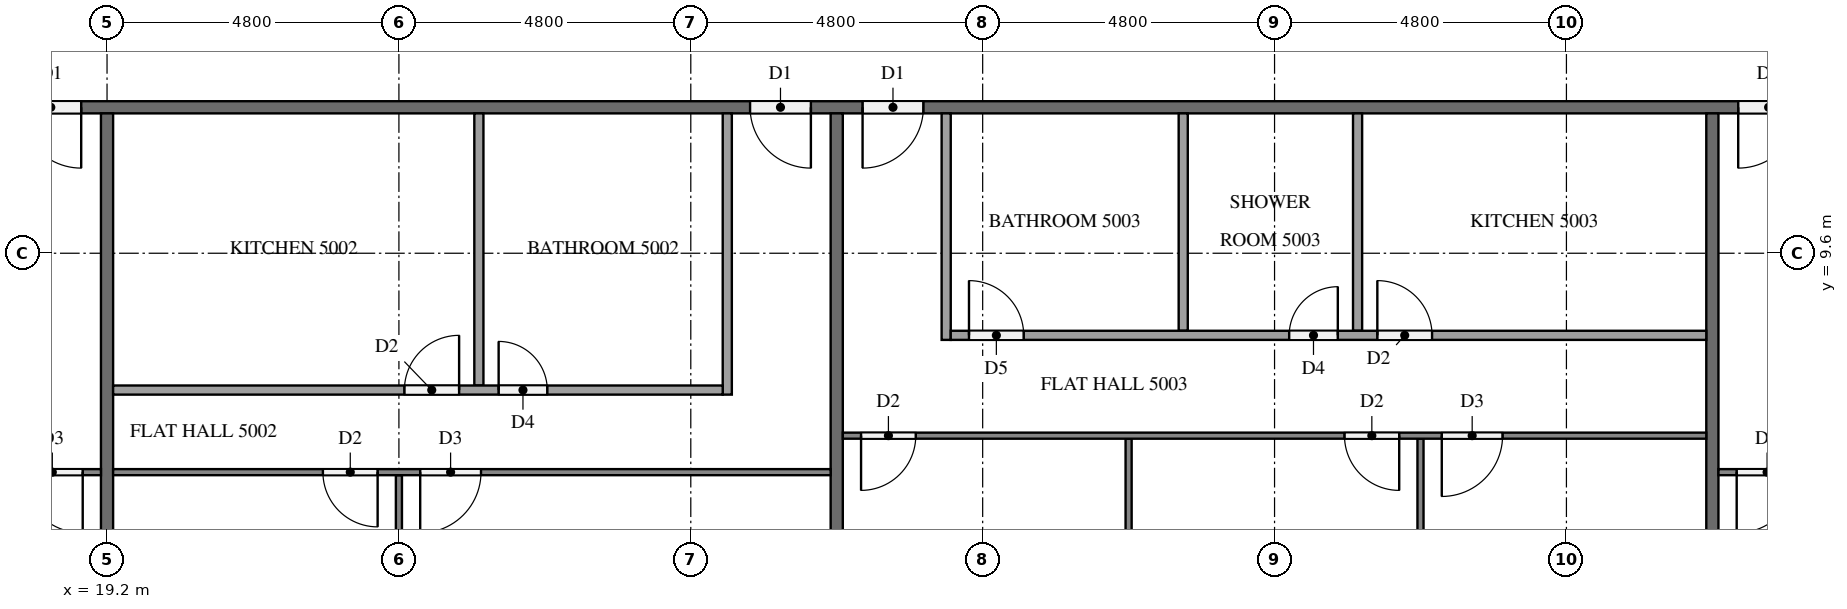
"""IFC4 building model, lengths in metres.
Left out: names, types, materials, properties, quantities, classifications, styles, units other than length and angle.
Written with IfcOpenShell. Run it as: python <this file> out.ifc"""

import sys

from ifc_helpers import new_model, si_unit, direction, frame, frame_2d, origin, place, context, subcontext, project, spatial, rectangle, extrude, element, fill, save


model = new_model("IFC4")
c1 = context("Model", 3, precision=1e-05, world=origin(), true_north=direction((0.0, 1.0)))
c2 = subcontext(c1, "Body", "Model", "MODEL_VIEW")
j1 = project(units=[si_unit("LENGTHUNIT", "METRE"), si_unit("PLANEANGLEUNIT", "RADIAN")], contexts=[c1])
p1 = place(None, origin())
s1 = spatial("IfcSite", under=j1, at=p1, CompositionType="ELEMENT")
p2 = place(p1, origin())
s2 = spatial("IfcBuilding", under=s1, at=p2, CompositionType="ELEMENT")
p3 = place(p2, frame((0.0, 0.0, 192.9)))
s3 = spatial("IfcBuildingStorey", under=s2, at=p3, CompositionType="ELEMENT", Elevation=192.9)
p4 = place(p3, frame((50.5, 12.0, 0.0), z_axis=(0.0, 0.0, 1.0), x_axis=(-1.0, 0.0, 0.0)))
e1 = element("IfcWall", 1, at=p4, inside=s3, PredefinedType="PARTITIONING", context=c2, shape_type="SweptSolid", body=[
    extrude(rectangle(XDim=38.6, YDim=0.2, at=frame_2d((19.3, 0.0))), origin(), (0.0, 0.0, 1.0), 3.2),
])
p5 = place(p4, frame((31.725, 0.0, 0.0)))
e2 = element("IfcOpeningElement", 2, at=p5, cuts=e1, PredefinedType="OPENING", context=c2, shape_type="SweptSolid", body=[
    extrude(rectangle(XDim=1.0, YDim=2.1, at=frame_2d((0.5, 1.05))), frame((0.0, 0.11, 0.0), z_axis=(0.0, -1.0, 0.0), x_axis=(1.0, 0.0, 0.0)), (0.0, 0.0, 1.0), 0.22),
])
p6 = place(p4, frame((19.725, 0.0, 0.0)))
e3 = element("IfcOpeningElement", 3, at=p6, cuts=e1, PredefinedType="OPENING", context=c2, shape_type="SweptSolid", body=[
    extrude(rectangle(XDim=1.0, YDim=2.1, at=frame_2d((0.5, 1.05))), frame((0.0, 0.11, 0.0), z_axis=(0.0, -1.0, 0.0), x_axis=(1.0, 0.0, 0.0)), (0.0, 0.0, 1.0), 0.22),
])
p7 = place(p4, frame((17.875, 0.0, 0.0)))
e4 = element("IfcOpeningElement", 4, at=p7, cuts=e1, PredefinedType="OPENING", context=c2, shape_type="SweptSolid", body=[
    extrude(rectangle(XDim=1.0, YDim=2.1, at=frame_2d((0.5, 1.05))), frame((0.0, 0.11, 0.0), z_axis=(0.0, -1.0, 0.0), x_axis=(1.0, 0.0, 0.0)), (0.0, 0.0, 1.0), 0.22),
])
p8 = place(p4, frame((3.475, 0.0, 0.0)))
e5 = element("IfcOpeningElement", 5, at=p8, cuts=e1, PredefinedType="OPENING", context=c2, shape_type="SweptSolid", body=[
    extrude(rectangle(XDim=1.0, YDim=2.1, at=frame_2d((0.5, 1.05))), frame((0.0, 0.11, 0.0), z_axis=(0.0, -1.0, 0.0), x_axis=(1.0, 0.0, 0.0)), (0.0, 0.0, 1.0), 0.22),
])
p9 = place(p3, frame((19.2, 11.9, 0.0), z_axis=(0.0, 0.0, 1.0), x_axis=(0.0, -1.0, 0.0)))
e6 = element("IfcWall", 6, at=p9, inside=s3, PredefinedType="PARTITIONING", context=c2, shape_type="SweptSolid", body=[
    extrude(rectangle(XDim=11.575, YDim=0.2, at=frame_2d((5.788, 0.0))), origin(), (0.0, 0.0, 1.0), 3.2),
])
for number, where, z_axis, x_axis in (
    (7, (31.2, 11.9, 0.0), (0.0, 0.0, 1.0), (0.0, -1.0, 0.0)),
    (8, (45.6, 11.9, 0.0), (0.0, 0.0, 1.0), (0.0, -1.0, 0.0)),
):
    element("IfcWall", number, at=place(p3, frame(where, z_axis=z_axis, x_axis=x_axis)), inside=s3, PredefinedType="PARTITIONING", context=c2, shape_type="SweptSolid", body=[
        extrude(rectangle(XDim=11.8, YDim=0.2, at=frame_2d((5.9, 0.0))), origin(), (0.0, 0.0, 1.0), 3.2),
    ])
p10 = place(p3, frame((19.1, 6.0, 0.0), z_axis=(0.0, 0.0, 1.0), x_axis=(-1.0, 0.0, 0.0)))
e9 = element("IfcWall", 9, at=p10, inside=s3, PredefinedType="PARTITIONING", context=c2, shape_type="SweptSolid", body=[
    extrude(rectangle(XDim=14.2, YDim=0.1, at=frame_2d((7.1, 0.0))), origin(), (0.0, 0.0, 1.0), 3.2),
])
p11 = place(p10, frame((0.3, 0.0, 0.0)))
e10 = element("IfcOpeningElement", 10, at=p11, cuts=e9, PredefinedType="OPENING", context=c2, shape_type="SweptSolid", body=[
    extrude(rectangle(XDim=1.0, YDim=2.1, at=frame_2d((0.5, 1.05))), frame((0.0, 0.06, 0.0), z_axis=(0.0, -1.0, 0.0), x_axis=(1.0, 0.0, 0.0)), (0.0, 0.0, 1.0), 0.12),
])
p12 = place(p10, frame((8.25, 0.0, 0.0)))
e11 = element("IfcOpeningElement", 11, at=p12, cuts=e9, PredefinedType="OPENING", context=c2, shape_type="SweptSolid", body=[
    extrude(rectangle(XDim=0.9, YDim=2.1, at=frame_2d((0.45, 1.05))), frame((0.0, 0.06, 0.0), z_axis=(0.0, -1.0, 0.0), x_axis=(1.0, 0.0, 0.0)), (0.0, 0.0, 1.0), 0.12),
])
p13 = place(p10, frame((9.85, 0.0, 0.0)))
e12 = element("IfcOpeningElement", 12, at=p13, cuts=e9, PredefinedType="OPENING", context=c2, shape_type="SweptSolid", body=[
    extrude(rectangle(XDim=0.9, YDim=2.1, at=frame_2d((0.45, 1.05))), frame((0.0, 0.06, 0.0), z_axis=(0.0, -1.0, 0.0), x_axis=(1.0, 0.0, 0.0)), (0.0, 0.0, 1.0), 0.12),
])
p14 = place(p3, frame((24.0, 5.95, 0.0), z_axis=(0.0, 0.0, 1.0), x_axis=(0.0, -1.0, 0.0)))
e13 = element("IfcWall", 13, at=p14, inside=s3, PredefinedType="PARTITIONING", context=c2, shape_type="SweptSolid", body=[
    extrude(rectangle(XDim=5.85, YDim=0.1, at=frame_2d((2.925, 0.0))), origin(), (0.0, 0.0, 1.0), 3.2),
])
p15 = place(p3, frame((31.1, 6.0, 0.0), z_axis=(0.0, 0.0, 1.0), x_axis=(-1.0, 0.0, 0.0)))
e14 = element("IfcWall", 14, at=p15, inside=s3, PredefinedType="PARTITIONING", context=c2, shape_type="SweptSolid", body=[
    extrude(rectangle(XDim=11.8, YDim=0.1, at=frame_2d((5.9, 0.0))), origin(), (0.0, 0.0, 1.0), 3.2),
])
p16 = place(p15, frame((5.75, 0.0, 0.0)))
e15 = element("IfcOpeningElement", 15, at=p16, cuts=e14, PredefinedType="OPENING", context=c2, shape_type="SweptSolid", body=[
    extrude(rectangle(XDim=1.0, YDim=2.1, at=frame_2d((0.5, 1.05))), frame((0.0, 0.06, 0.0), z_axis=(0.0, -1.0, 0.0), x_axis=(1.0, 0.0, 0.0)), (0.0, 0.0, 1.0), 0.12),
])
p17 = place(p15, frame((7.45, 0.0, 0.0)))
e16 = element("IfcOpeningElement", 16, at=p17, cuts=e14, PredefinedType="OPENING", context=c2, shape_type="SweptSolid", body=[
    extrude(rectangle(XDim=0.9, YDim=2.1, at=frame_2d((0.45, 1.05))), frame((0.0, 0.06, 0.0), z_axis=(0.0, -1.0, 0.0), x_axis=(1.0, 0.0, 0.0)), (0.0, 0.0, 1.0), 0.12),
])
p18 = place(p3, frame((25.315, 11.9, 0.0), z_axis=(0.0, 0.0, 1.0), x_axis=(0.0, -1.0, 0.0)))
e17 = element("IfcWall", 17, at=p18, inside=s3, PredefinedType="PARTITIONING", context=c2, shape_type="SweptSolid", body=[
    extrude(rectangle(XDim=4.475, YDim=0.15, at=frame_2d((2.237, 0.0))), origin(), (0.0, 0.0, 1.0), 3.2),
])
p19 = place(p3, frame((29.4, 11.9, 0.0), z_axis=(0.0, 0.0, 1.0), x_axis=(0.0, -1.0, 0.0)))
e18 = element("IfcWall", 18, at=p19, inside=s3, PredefinedType="PARTITIONING", context=c2, shape_type="SweptSolid", body=[
    extrude(rectangle(XDim=4.625, YDim=0.15, at=frame_2d((2.312, 0.0))), origin(), (0.0, 0.0, 1.0), 3.2),
])
p20 = place(p3, frame((19.3, 7.35, 0.0), z_axis=(0.0, 0.0, 1.0), x_axis=(1.0, 0.0, 0.0)))
e19 = element("IfcWall", 19, at=p20, inside=s3, PredefinedType="PARTITIONING", context=c2, shape_type="SweptSolid", body=[
    extrude(rectangle(XDim=10.025, YDim=0.15, at=frame_2d((5.012, 0.0))), origin(), (0.0, 0.0, 1.0), 3.2),
])
p21 = place(p20, frame((6.34, 0.0, 0.0)))
e20 = element("IfcOpeningElement", 20, at=p21, cuts=e19, PredefinedType="OPENING", context=c2, shape_type="SweptSolid", body=[
    extrude(rectangle(XDim=0.8, YDim=2.1, at=frame_2d((0.4, 1.05))), frame((0.0, 0.085, 0.0), z_axis=(0.0, -1.0, 0.0), x_axis=(1.0, 0.0, 0.0)), (0.0, 0.0, 1.0), 0.17),
])
p22 = place(p20, frame((4.79, 0.0, 0.0)))
e21 = element("IfcOpeningElement", 21, at=p22, cuts=e19, PredefinedType="OPENING", context=c2, shape_type="SweptSolid", body=[
    extrude(rectangle(XDim=0.9, YDim=2.1, at=frame_2d((0.45, 1.05))), frame((0.0, 0.085, 0.0), z_axis=(0.0, -1.0, 0.0), x_axis=(1.0, 0.0, 0.0)), (0.0, 0.0, 1.0), 0.17),
])
for number, where, z_axis, x_axis in (
    (22, (36.0, 6.55, 0.0), (0.0, 0.0, 1.0), (0.0, -1.0, 0.0)),
    (23, (40.8, 6.55, 0.0), (0.0, 0.0, 1.0), (0.0, -1.0, 0.0)),
):
    element("IfcWall", number, at=place(p3, frame(where, z_axis=z_axis, x_axis=x_axis)), inside=s3, PredefinedType="PARTITIONING", context=c2, shape_type="SweptSolid", body=[
        extrude(rectangle(XDim=6.45, YDim=0.1, at=frame_2d((3.225, 0.0))), origin(), (0.0, 0.0, 1.0), 3.2),
    ])
p23 = place(p3, frame((45.5, 6.6, 0.0), z_axis=(0.0, 0.0, 1.0), x_axis=(-1.0, 0.0, 0.0)))
e24 = element("IfcWall", 24, at=p23, inside=s3, PredefinedType="PARTITIONING", context=c2, shape_type="SweptSolid", body=[
    extrude(rectangle(XDim=14.2, YDim=0.1, at=frame_2d((7.1, 0.0))), origin(), (0.0, 0.0, 1.0), 3.2),
])
p24 = place(p23, frame((13.0, 0.0, 0.0)))
e25 = element("IfcOpeningElement", 25, at=p24, cuts=e24, PredefinedType="OPENING", context=c2, shape_type="SweptSolid", body=[
    extrude(rectangle(XDim=0.9, YDim=2.1, at=frame_2d((0.45, 1.05))), frame((0.0, 0.06, 0.0), z_axis=(0.0, -1.0, 0.0), x_axis=(1.0, 0.0, 0.0)), (0.0, 0.0, 1.0), 0.12),
])
p25 = place(p23, frame((5.05, 0.0, 0.0)))
e26 = element("IfcOpeningElement", 26, at=p25, cuts=e24, PredefinedType="OPENING", context=c2, shape_type="SweptSolid", body=[
    extrude(rectangle(XDim=0.9, YDim=2.1, at=frame_2d((0.45, 1.05))), frame((0.0, 0.06, 0.0), z_axis=(0.0, -1.0, 0.0), x_axis=(1.0, 0.0, 0.0)), (0.0, 0.0, 1.0), 0.12),
])
p26 = place(p23, frame((3.35, 0.0, 0.0)))
e27 = element("IfcOpeningElement", 27, at=p26, cuts=e24, PredefinedType="OPENING", context=c2, shape_type="SweptSolid", body=[
    extrude(rectangle(XDim=1.0, YDim=2.1, at=frame_2d((0.5, 1.05))), frame((0.0, 0.06, 0.0), z_axis=(0.0, -1.0, 0.0), x_axis=(1.0, 0.0, 0.0)), (0.0, 0.0, 1.0), 0.12),
])
for number, where, z_axis, x_axis in (
    (28, (36.898, 11.9, 0.0), (0.0, 0.0, 1.0), (0.0, -1.0, 0.0)),
    (29, (39.765, 11.9, 0.0), (0.0, 0.0, 1.0), (0.0, -1.0, 0.0)),
):
    element("IfcWall", number, at=place(p3, frame(where, z_axis=z_axis, x_axis=x_axis)), inside=s3, PredefinedType="PARTITIONING", context=c2, shape_type="SweptSolid", body=[
        extrude(rectangle(XDim=3.575, YDim=0.15, at=frame_2d((1.788, 0.0))), origin(), (0.0, 0.0, 1.0), 3.2),
    ])
p27 = place(p3, frame((33.0, 11.9, 0.0), z_axis=(0.0, 0.0, 1.0), x_axis=(0.0, -1.0, 0.0)))
e30 = element("IfcWall", 30, at=p27, inside=s3, PredefinedType="PARTITIONING", context=c2, shape_type="SweptSolid", body=[
    extrude(rectangle(XDim=3.725, YDim=0.15, at=frame_2d((1.862, 0.0))), origin(), (0.0, 0.0, 1.0), 3.2),
])
p28 = place(p3, frame((33.075, 8.25, 0.0), z_axis=(0.0, 0.0, 1.0), x_axis=(1.0, 0.0, 0.0)))
e31 = element("IfcWall", 31, at=p28, inside=s3, PredefinedType="PARTITIONING", context=c2, shape_type="SweptSolid", body=[
    extrude(rectangle(XDim=12.425, YDim=0.15, at=frame_2d((6.212, 0.0))), origin(), (0.0, 0.0, 1.0), 3.2),
])
p29 = place(p28, frame((0.3, 0.0, 0.0)))
e32 = element("IfcOpeningElement", 32, at=p29, cuts=e31, PredefinedType="OPENING", context=c2, shape_type="SweptSolid", body=[
    extrude(rectangle(XDim=0.9, YDim=2.1, at=frame_2d((0.45, 1.05))), frame((0.0, 0.085, 0.0), z_axis=(0.0, -1.0, 0.0), x_axis=(1.0, 0.0, 0.0)), (0.0, 0.0, 1.0), 0.17),
])
p30 = place(p28, frame((5.565, 0.0, 0.0)))
e33 = element("IfcOpeningElement", 33, at=p30, cuts=e31, PredefinedType="OPENING", context=c2, shape_type="SweptSolid", body=[
    extrude(rectangle(XDim=0.8, YDim=2.1, at=frame_2d((0.4, 1.05))), frame((0.0, 0.085, 0.0), z_axis=(0.0, -1.0, 0.0), x_axis=(1.0, 0.0, 0.0)), (0.0, 0.0, 1.0), 0.17),
])
p31 = place(p28, frame((7.015, 0.0, 0.0)))
e34 = element("IfcOpeningElement", 34, at=p31, cuts=e31, PredefinedType="OPENING", context=c2, shape_type="SweptSolid", body=[
    extrude(rectangle(XDim=0.9, YDim=2.1, at=frame_2d((0.45, 1.05))), frame((0.0, 0.085, 0.0), z_axis=(0.0, -1.0, 0.0), x_axis=(1.0, 0.0, 0.0)), (0.0, 0.0, 1.0), 0.17),
])
p32 = place(p3, frame((62.3, 6.0, 0.0), z_axis=(0.0, 0.0, 1.0), x_axis=(-1.0, 0.0, 0.0)))
e35 = element("IfcWall", 35, at=p32, inside=s3, PredefinedType="PARTITIONING", context=c2, shape_type="SweptSolid", body=[
    extrude(rectangle(XDim=16.6, YDim=0.1, at=frame_2d((8.3, 0.0))), origin(), (0.0, 0.0, 1.0), 3.2),
])
p33 = place(p32, frame((15.3, 0.0, 0.0)))
e36 = element("IfcOpeningElement", 36, at=p33, cuts=e35, PredefinedType="OPENING", context=c2, shape_type="SweptSolid", body=[
    extrude(rectangle(XDim=1.0, YDim=2.1, at=frame_2d((0.5, 1.05))), frame((0.0, 0.06, 0.0), z_axis=(0.0, -1.0, 0.0), x_axis=(1.0, 0.0, 0.0)), (0.0, 0.0, 1.0), 0.12),
])
p34 = place(p32, frame((5.05, 0.0, 0.0)))
e37 = element("IfcOpeningElement", 37, at=p34, cuts=e35, PredefinedType="OPENING", context=c2, shape_type="SweptSolid", body=[
    extrude(rectangle(XDim=0.9, YDim=2.1, at=frame_2d((0.45, 1.05))), frame((0.0, 0.06, 0.0), z_axis=(0.0, -1.0, 0.0), x_axis=(1.0, 0.0, 0.0)), (0.0, 0.0, 1.0), 0.12),
])
p35 = place(p32, frame((3.45, 0.0, 0.0)))
e38 = element("IfcOpeningElement", 38, at=p35, cuts=e35, PredefinedType="OPENING", context=c2, shape_type="SweptSolid", body=[
    extrude(rectangle(XDim=0.9, YDim=2.1, at=frame_2d((0.45, 1.05))), frame((0.0, 0.06, 0.0), z_axis=(0.0, -1.0, 0.0), x_axis=(1.0, 0.0, 0.0)), (0.0, 0.0, 1.0), 0.12),
])
p36 = place(p5, origin())
e39 = element("IfcDoor", 39, at=p36, inside=s3, OperationType="SINGLE_SWING_LEFT", PredefinedType="DOOR", context=c2, shape_type="SweptSolid", body=[
    extrude(rectangle(XDim=1.0, YDim=2.1, at=frame_2d((0.5, 1.05))), frame((0.0, 0.025, 0.0), z_axis=(0.0, -1.0, 0.0), x_axis=(1.0, 0.0, 0.0)), (0.0, 0.0, 1.0), 0.05),
])
fill(e2, e39)
p37 = place(p6, origin())
e40 = element("IfcDoor", 40, at=p37, inside=s3, OperationType="SINGLE_SWING_LEFT", PredefinedType="DOOR", context=c2, shape_type="SweptSolid", body=[
    extrude(rectangle(XDim=1.0, YDim=2.1, at=frame_2d((0.5, 1.05))), frame((0.0, 0.025, 0.0), z_axis=(0.0, -1.0, 0.0), x_axis=(1.0, 0.0, 0.0)), (0.0, 0.0, 1.0), 0.05),
])
fill(e3, e40)
p38 = place(p7, origin())
e41 = element("IfcDoor", 41, at=p38, inside=s3, OperationType="SINGLE_SWING_RIGHT", PredefinedType="DOOR", context=c2, shape_type="SweptSolid", body=[
    extrude(rectangle(XDim=1.0, YDim=2.1, at=frame_2d((0.5, 1.05))), frame((0.0, 0.025, 0.0), z_axis=(0.0, -1.0, 0.0), x_axis=(1.0, 0.0, 0.0)), (0.0, 0.0, 1.0), 0.05),
])
fill(e4, e41)
p39 = place(p8, origin())
e42 = element("IfcDoor", 42, at=p39, inside=s3, OperationType="SINGLE_SWING_RIGHT", PredefinedType="DOOR", context=c2, shape_type="SweptSolid", body=[
    extrude(rectangle(XDim=1.0, YDim=2.1, at=frame_2d((0.5, 1.05))), frame((0.0, 0.025, 0.0), z_axis=(0.0, -1.0, 0.0), x_axis=(1.0, 0.0, 0.0)), (0.0, 0.0, 1.0), 0.05),
])
fill(e5, e42)
p40 = place(p11, origin())
e43 = element("IfcDoor", 43, at=p40, inside=s3, OperationType="SINGLE_SWING_LEFT", PredefinedType="DOOR", context=c2, shape_type="SweptSolid", body=[
    extrude(rectangle(XDim=1.0, YDim=2.1, at=frame_2d((0.5, 1.05))), frame((0.0, 0.025, 0.0), z_axis=(0.0, -1.0, 0.0), x_axis=(1.0, 0.0, 0.0)), (0.0, 0.0, 1.0), 0.05),
])
fill(e10, e43)
p41 = place(p16, origin())
e44 = element("IfcDoor", 44, at=p41, inside=s3, OperationType="SINGLE_SWING_RIGHT", PredefinedType="DOOR", context=c2, shape_type="SweptSolid", body=[
    extrude(rectangle(XDim=1.0, YDim=2.1, at=frame_2d((0.5, 1.05))), frame((0.0, 0.025, 0.0), z_axis=(0.0, -1.0, 0.0), x_axis=(1.0, 0.0, 0.0)), (0.0, 0.0, 1.0), 0.05),
])
fill(e15, e44)
p42 = place(p17, origin())
e45 = element("IfcDoor", 45, at=p42, inside=s3, OperationType="SINGLE_SWING_LEFT", PredefinedType="DOOR", context=c2, shape_type="SweptSolid", body=[
    extrude(rectangle(XDim=0.9, YDim=2.1, at=frame_2d((0.45, 1.05))), frame((0.0, 0.025, 0.0), z_axis=(0.0, -1.0, 0.0), x_axis=(1.0, 0.0, 0.0)), (0.0, 0.0, 1.0), 0.05),
])
fill(e16, e45)
p43 = place(p21, origin())
e46 = element("IfcDoor", 46, at=p43, inside=s3, OperationType="SINGLE_SWING_LEFT", PredefinedType="DOOR", context=c2, shape_type="SweptSolid", body=[
    extrude(rectangle(XDim=0.8, YDim=2.1, at=frame_2d((0.4, 1.05))), frame((0.0, 0.025, 0.0), z_axis=(0.0, -1.0, 0.0), x_axis=(1.0, 0.0, 0.0)), (0.0, 0.0, 1.0), 0.05),
])
fill(e20, e46)
p44 = place(p22, origin())
e47 = element("IfcDoor", 47, at=p44, inside=s3, OperationType="SINGLE_SWING_RIGHT", PredefinedType="DOOR", context=c2, shape_type="SweptSolid", body=[
    extrude(rectangle(XDim=0.9, YDim=2.1, at=frame_2d((0.45, 1.05))), frame((0.0, 0.025, 0.0), z_axis=(0.0, -1.0, 0.0), x_axis=(1.0, 0.0, 0.0)), (0.0, 0.0, 1.0), 0.05),
])
fill(e21, e47)
p45 = place(p24, origin())
e48 = element("IfcDoor", 48, at=p45, inside=s3, OperationType="SINGLE_SWING_RIGHT", PredefinedType="DOOR", context=c2, shape_type="SweptSolid", body=[
    extrude(rectangle(XDim=0.9, YDim=2.1, at=frame_2d((0.45, 1.05))), frame((0.0, 0.025, 0.0), z_axis=(0.0, -1.0, 0.0), x_axis=(1.0, 0.0, 0.0)), (0.0, 0.0, 1.0), 0.05),
])
fill(e25, e48)
p46 = place(p25, origin())
e49 = element("IfcDoor", 49, at=p46, inside=s3, OperationType="SINGLE_SWING_LEFT", PredefinedType="DOOR", context=c2, shape_type="SweptSolid", body=[
    extrude(rectangle(XDim=0.9, YDim=2.1, at=frame_2d((0.45, 1.05))), frame((0.0, 0.025, 0.0), z_axis=(0.0, -1.0, 0.0), x_axis=(1.0, 0.0, 0.0)), (0.0, 0.0, 1.0), 0.05),
])
fill(e26, e49)
p47 = place(p26, origin())
e50 = element("IfcDoor", 50, at=p47, inside=s3, OperationType="SINGLE_SWING_RIGHT", PredefinedType="DOOR", context=c2, shape_type="SweptSolid", body=[
    extrude(rectangle(XDim=1.0, YDim=2.1, at=frame_2d((0.5, 1.05))), frame((0.0, 0.025, 0.0), z_axis=(0.0, -1.0, 0.0), x_axis=(1.0, 0.0, 0.0)), (0.0, 0.0, 1.0), 0.05),
])
fill(e27, e50)
p48 = place(p29, origin())
e51 = element("IfcDoor", 51, at=p48, inside=s3, OperationType="SINGLE_SWING_LEFT", PredefinedType="DOOR", context=c2, shape_type="SweptSolid", body=[
    extrude(rectangle(XDim=0.9, YDim=2.1, at=frame_2d((0.45, 1.05))), frame((0.0, 0.025, 0.0), z_axis=(0.0, -1.0, 0.0), x_axis=(1.0, 0.0, 0.0)), (0.0, 0.0, 1.0), 0.05),
])
fill(e32, e51)
p49 = place(p30, origin())
e52 = element("IfcDoor", 52, at=p49, inside=s3, OperationType="SINGLE_SWING_RIGHT", PredefinedType="DOOR", context=c2, shape_type="SweptSolid", body=[
    extrude(rectangle(XDim=0.8, YDim=2.1, at=frame_2d((0.4, 1.05))), frame((0.0, 0.025, 0.0), z_axis=(0.0, -1.0, 0.0), x_axis=(1.0, 0.0, 0.0)), (0.0, 0.0, 1.0), 0.05),
])
fill(e33, e52)
p50 = place(p31, origin())
e53 = element("IfcDoor", 53, at=p50, inside=s3, OperationType="SINGLE_SWING_LEFT", PredefinedType="DOOR", context=c2, shape_type="SweptSolid", body=[
    extrude(rectangle(XDim=0.9, YDim=2.1, at=frame_2d((0.45, 1.05))), frame((0.0, 0.025, 0.0), z_axis=(0.0, -1.0, 0.0), x_axis=(1.0, 0.0, 0.0)), (0.0, 0.0, 1.0), 0.05),
])
fill(e34, e53)
p51 = place(p33, origin())
e54 = element("IfcDoor", 54, at=p51, inside=s3, OperationType="SINGLE_SWING_RIGHT", PredefinedType="DOOR", context=c2, shape_type="SweptSolid", body=[
    extrude(rectangle(XDim=1.0, YDim=2.1, at=frame_2d((0.5, 1.05))), frame((0.0, 0.025, 0.0), z_axis=(0.0, -1.0, 0.0), x_axis=(1.0, 0.0, 0.0)), (0.0, 0.0, 1.0), 0.05),
])
fill(e36, e54)
save(model, sys.argv[1])
